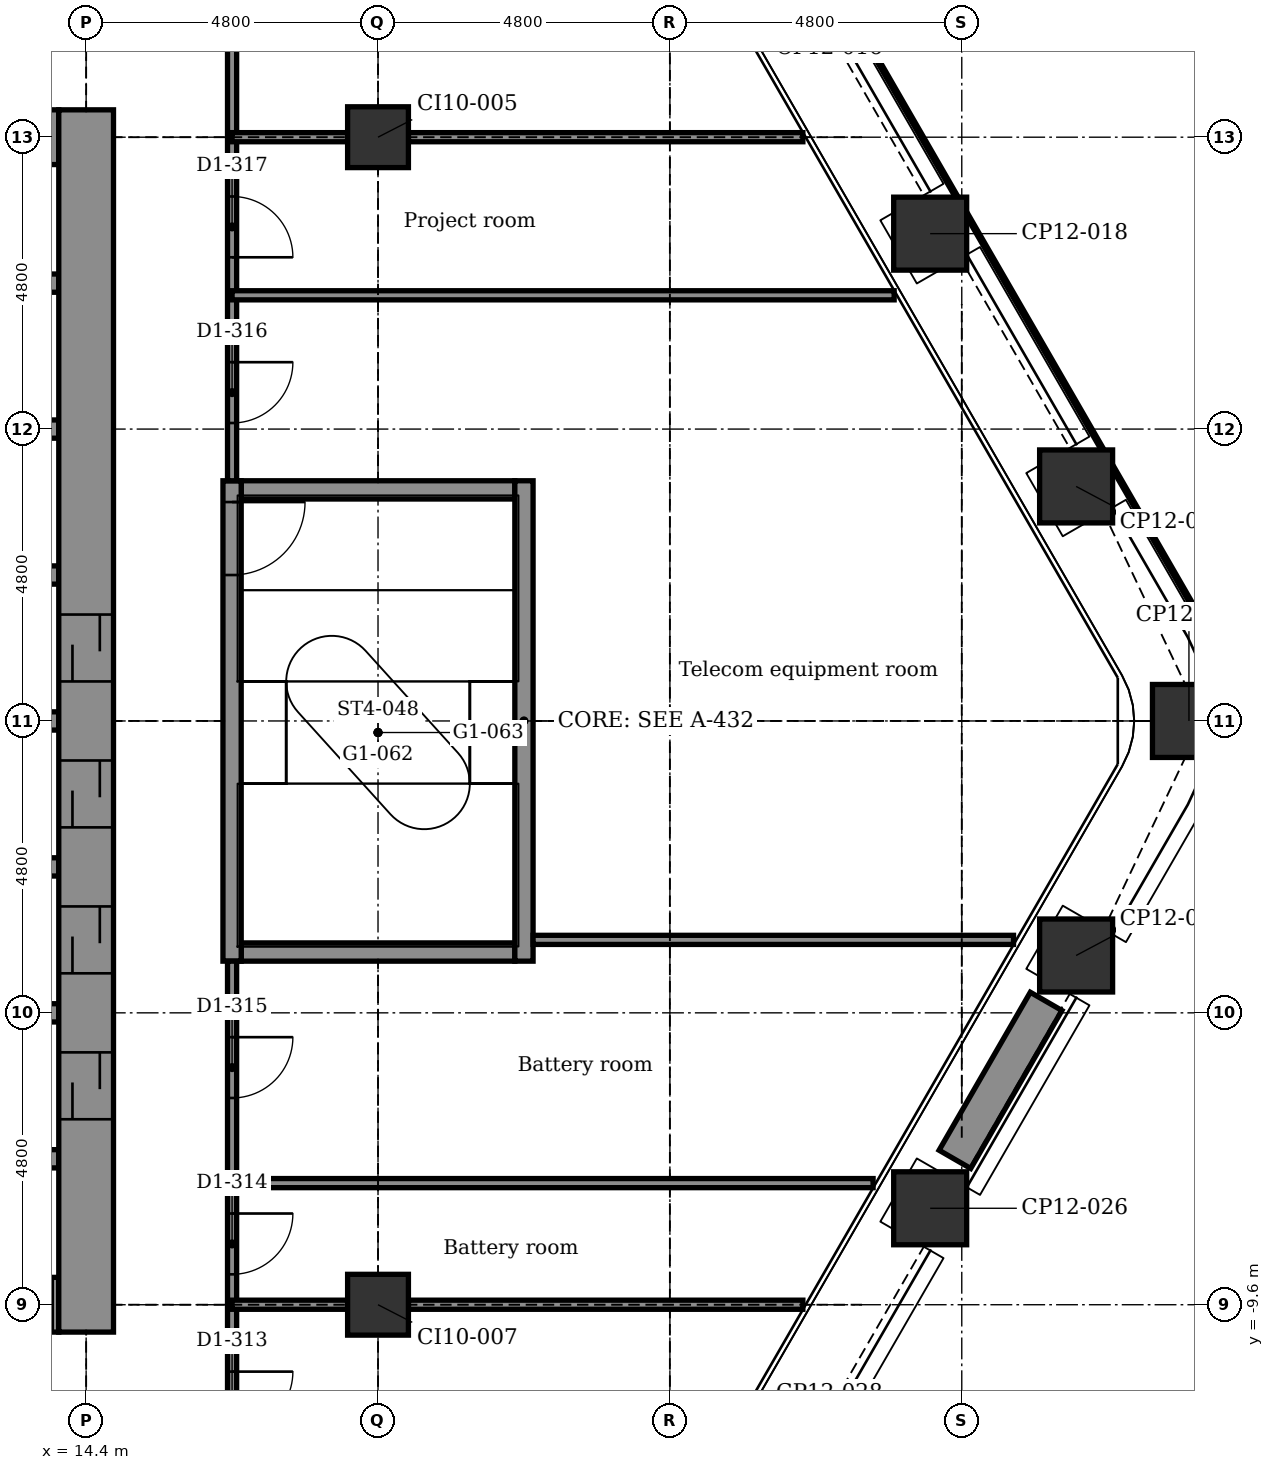
"""IFC4 building model, lengths in metres.
Left out: names, types, materials, properties, quantities, classifications, styles, units other than length and angle.
Written with IfcOpenShell. Run it as: python <this file> out.ifc"""

import sys

from ifc_helpers import new_model, si_unit, direction, frame, frame_2d, origin, origin_2d, place, context, subcontext, project, spatial, rectangle, extrude, element, fill, save


model = new_model("IFC4")
c1 = context("Model", 3, precision=1e-05, world=origin(), true_north=direction((0.0, 1.0)))
c2 = subcontext(c1, "Body", "Model", "MODEL_VIEW")
j1 = project(units=[si_unit("LENGTHUNIT", "METRE"), si_unit("PLANEANGLEUNIT", "RADIAN")], contexts=[c1])
p1 = place(None, origin())
s1 = spatial("IfcSite", under=j1, at=p1, CompositionType="ELEMENT")
p2 = place(p1, origin())
s2 = spatial("IfcBuilding", under=s1, at=p2, CompositionType="ELEMENT")
p3 = place(p2, frame((0.0, 0.0, 113.9)))
s3 = spatial("IfcBuildingStorey", under=s2, at=p3, CompositionType="ELEMENT", Elevation=113.9)
for number, where, z_axis, x_axis in (
    (1, (28.28, 8.014, -0.2), (0.0, 0.0, 1.0), (0.866, 0.5, 0.0)),
    (2, (30.68, 3.857, -0.2), (0.0, 0.0, 1.0), (0.866, 0.5, 0.0)),
    (3, (32.536, 0.0, -0.2), (0.0, 0.0, 1.0), (1.0, 0.0, 0.0)),
    (4, (30.68, -3.857, -0.2), (0.0, 0.0, 1.0), (0.5, 0.866, 0.0)),
    (5, (28.28, -8.014, -0.2), (0.0, 0.0, 1.0), (0.5, 0.866, 0.0)),
):
    element("IfcColumn", number, at=place(p3, frame(where, z_axis=z_axis, x_axis=x_axis)), inside=s3, PredefinedType="COLUMN", context=c2, shape_type="SweptSolid", body=[
        extrude(rectangle(XDim=1.2, YDim=1.2, at=origin_2d()), origin(), (0.0, 0.0, 1.0), 4.5),
    ])
for number, where, z_axis, x_axis in (
    (6, (19.2, -9.6, -0.2), (0.0, 0.0, 1.0), (1.0, 0.0, 0.0)),
    (7, (19.2, 9.6, -0.2), (0.0, 0.0, 1.0), (1.0, 0.0, 0.0)),
):
    element("IfcColumn", number, at=place(p3, frame(where, z_axis=z_axis, x_axis=x_axis)), inside=s3, PredefinedType="COLUMN", context=c2, shape_type="SweptSolid", body=[
        extrude(rectangle(XDim=1.0, YDim=1.0, at=origin_2d()), origin(), (0.0, 0.0, 1.0), 4.5),
    ])
p4 = place(p3, frame((10.05, -9.6, -0.2), z_axis=(0.0, 0.0, 1.0), x_axis=(1.0, 0.0, 0.0)))
e8 = element("IfcWall", 8, at=p4, inside=s3, PredefinedType="SHEAR", context=c2, shape_type="SweptSolid", body=[
    extrude(rectangle(XDim=3.9, YDim=0.9, at=frame_2d((1.95, 0.0))), origin(), (0.0, 0.0, 1.0), 4.5),
])
p5 = place(p4, frame((0.5, 0.0, 0.2)))
e9 = element("IfcOpeningElement", 9, at=p5, cuts=e8, PredefinedType="OPENING", context=c2, shape_type="SweptSolid", body=[
    extrude(rectangle(XDim=0.9, YDim=2.1, at=frame_2d((0.45, 1.05))), frame((0.0, 0.46, 0.0), z_axis=(0.0, -1.0, 0.0), x_axis=(1.0, 0.0, 0.0)), (0.0, 0.0, 1.0), 0.92),
])
p6 = place(p4, frame((2.9, 0.0, 0.2)))
e10 = element("IfcOpeningElement", 10, at=p6, cuts=e8, PredefinedType="OPENING", context=c2, shape_type="SweptSolid", body=[
    extrude(rectangle(XDim=0.9, YDim=2.1, at=frame_2d((0.45, 1.05))), frame((0.0, 0.46, 0.0), z_axis=(0.0, -1.0, 0.0), x_axis=(1.0, 0.0, 0.0)), (0.0, 0.0, 1.0), 0.92),
])
for number, where, z_axis, x_axis in (
    (11, (10.05, -7.2, -0.2), (0.0, 0.0, 1.0), (1.0, 0.0, 0.0)),
    (12, (10.05, -4.8, -0.2), (0.0, 0.0, 1.0), (1.0, 0.0, 0.0)),
):
    element("IfcWall", number, at=place(p3, frame(where, z_axis=z_axis, x_axis=x_axis)), inside=s3, PredefinedType="STANDARD", context=c2, shape_type="SweptSolid", body=[
        extrude(rectangle(XDim=3.9, YDim=0.3, at=frame_2d((1.95, 0.0))), origin(), (0.0, 0.0, 1.0), 4.5),
    ])
p7 = place(p3, frame((16.95, -3.8, -0.2), z_axis=(0.0, 0.0, 1.0), x_axis=(1.0, 0.0, 0.0)))
e13 = element("IfcWall", 13, at=p7, inside=s3, PredefinedType="STANDARD", context=c2, shape_type="SweptSolid", body=[
    extrude(rectangle(XDim=4.5, YDim=0.3, at=frame_2d((2.25, 0.0))), origin(), (0.0, 0.0, 1.0), 4.5),
])
for number, where, z_axis, x_axis in (
    (14, (10.05, -2.4, -0.2), (0.0, 0.0, 1.0), (1.0, 0.0, 0.0)),
    (15, (10.05, 0.0, -0.2), (0.0, 0.0, 1.0), (1.0, 0.0, 0.0)),
    (16, (10.05, 2.4, -0.2), (0.0, 0.0, 1.0), (1.0, 0.0, 0.0)),
):
    element("IfcWall", number, at=place(p3, frame(where, z_axis=z_axis, x_axis=x_axis)), inside=s3, PredefinedType="STANDARD", context=c2, shape_type="SweptSolid", body=[
        extrude(rectangle(XDim=3.9, YDim=0.3, at=frame_2d((1.95, 0.0))), origin(), (0.0, 0.0, 1.0), 4.5),
    ])
p8 = place(p3, frame((16.95, 3.8, -0.2), z_axis=(0.0, 0.0, 1.0), x_axis=(1.0, 0.0, 0.0)))
e17 = element("IfcWall", 17, at=p8, inside=s3, PredefinedType="STANDARD", context=c2, shape_type="SweptSolid", body=[
    extrude(rectangle(XDim=4.5, YDim=0.3, at=frame_2d((2.25, 0.0))), origin(), (0.0, 0.0, 1.0), 4.5),
])
for number, where, z_axis, x_axis in (
    (18, (10.05, 4.8, -0.2), (0.0, 0.0, 1.0), (1.0, 0.0, 0.0)),
    (19, (10.05, 7.2, -0.2), (0.0, 0.0, 1.0), (1.0, 0.0, 0.0)),
):
    element("IfcWall", number, at=place(p3, frame(where, z_axis=z_axis, x_axis=x_axis)), inside=s3, PredefinedType="STANDARD", context=c2, shape_type="SweptSolid", body=[
        extrude(rectangle(XDim=3.9, YDim=0.3, at=frame_2d((1.95, 0.0))), origin(), (0.0, 0.0, 1.0), 4.5),
    ])
p9 = place(p3, frame((10.05, 9.6, -0.2), z_axis=(0.0, 0.0, 1.0), x_axis=(1.0, 0.0, 0.0)))
e20 = element("IfcWall", 20, at=p9, inside=s3, PredefinedType="SHEAR", context=c2, shape_type="SweptSolid", body=[
    extrude(rectangle(XDim=3.9, YDim=0.9, at=frame_2d((1.95, 0.0))), origin(), (0.0, 0.0, 1.0), 4.5),
])
p10 = place(p9, frame((1.5, 0.0, 0.2)))
e21 = element("IfcOpeningElement", 21, at=p10, cuts=e20, PredefinedType="OPENING", context=c2, shape_type="SweptSolid", body=[
    extrude(rectangle(XDim=0.9, YDim=2.1, at=frame_2d((0.45, 1.05))), frame((0.0, 0.46, 0.0), z_axis=(0.0, -1.0, 0.0), x_axis=(1.0, 0.0, 0.0)), (0.0, 0.0, 1.0), 0.92),
])
p11 = place(p3, frame((14.4, -10.05, -0.2), z_axis=(0.0, 0.0, 1.0), x_axis=(0.0, 1.0, 0.0)))
e22 = element("IfcWall", 22, at=p11, inside=s3, PredefinedType="SHEAR", context=c2, shape_type="SweptSolid", body=[
    extrude(rectangle(XDim=20.1, YDim=0.9, at=frame_2d((10.05, 0.0))), origin(), (0.0, 0.0, 1.0), 4.5),
])
p12 = place(p11, frame((3.5, 0.0, 0.2)))
e23 = element("IfcOpeningElement", 23, at=p12, cuts=e22, PredefinedType="OPENING", context=c2, shape_type="SweptSolid", body=[
    extrude(rectangle(XDim=1.1, YDim=2.1, at=frame_2d((0.55, 1.05))), frame((0.0, 0.46, 0.0), z_axis=(0.0, -1.0, 0.0), x_axis=(1.0, 0.0, 0.0)), (0.0, 0.0, 1.0), 0.92),
])
p13 = place(p11, frame((5.9, 0.0, 0.2)))
e24 = element("IfcOpeningElement", 24, at=p13, cuts=e22, PredefinedType="OPENING", context=c2, shape_type="SweptSolid", body=[
    extrude(rectangle(XDim=1.1, YDim=2.1, at=frame_2d((0.55, 1.05))), frame((0.0, 0.46, 0.0), z_axis=(0.0, -1.0, 0.0), x_axis=(1.0, 0.0, 0.0)), (0.0, 0.0, 1.0), 0.92),
])
p14 = place(p11, frame((8.3, 0.0, 0.2)))
e25 = element("IfcOpeningElement", 25, at=p14, cuts=e22, PredefinedType="OPENING", context=c2, shape_type="SweptSolid", body=[
    extrude(rectangle(XDim=1.1, YDim=2.1, at=frame_2d((0.55, 1.05))), frame((0.0, 0.46, 0.0), z_axis=(0.0, -1.0, 0.0), x_axis=(1.0, 0.0, 0.0)), (0.0, 0.0, 1.0), 0.92),
])
p15 = place(p11, frame((10.7, 0.0, 0.2)))
e26 = element("IfcOpeningElement", 26, at=p15, cuts=e22, PredefinedType="OPENING", context=c2, shape_type="SweptSolid", body=[
    extrude(rectangle(XDim=1.1, YDim=2.1, at=frame_2d((0.55, 1.05))), frame((0.0, 0.46, 0.0), z_axis=(0.0, -1.0, 0.0), x_axis=(1.0, 0.0, 0.0)), (0.0, 0.0, 1.0), 0.92),
])
p16 = place(p3, frame((16.8, -3.95, -0.2), z_axis=(0.0, 0.0, 1.0), x_axis=(0.0, 1.0, 0.0)))
e27 = element("IfcWall", 27, at=p16, inside=s3, PredefinedType="STANDARD", context=c2, shape_type="SweptSolid", body=[
    extrude(rectangle(XDim=7.9, YDim=0.3, at=frame_2d((3.95, 0.0))), origin(), (0.0, 0.0, 1.0), 4.5),
])
p17 = place(p16, frame((6.35, 0.0, 0.2)))
e28 = element("IfcOpeningElement", 28, at=p17, cuts=e27, PredefinedType="OPENING", context=c2, shape_type="SweptSolid", body=[
    extrude(rectangle(XDim=1.2, YDim=2.1, at=frame_2d((0.6, 1.05))), frame((0.0, 0.16, 0.0), z_axis=(0.0, -1.0, 0.0), x_axis=(1.0, 0.0, 0.0)), (0.0, 0.0, 1.0), 0.32),
])
p18 = place(p3, frame((21.6, -3.95, -0.2), z_axis=(0.0, 0.0, 1.0), x_axis=(0.0, 1.0, 0.0)))
e29 = element("IfcWall", 29, at=p18, inside=s3, PredefinedType="STANDARD", context=c2, shape_type="SweptSolid", body=[
    extrude(rectangle(XDim=7.9, YDim=0.3, at=frame_2d((3.95, 0.0))), origin(), (0.0, 0.0, 1.0), 4.5),
])
p19 = place(p3, frame((30.187, -4.611, 0.0), z_axis=(0.0, 0.0, 1.0), x_axis=(-0.499990139034, -0.866031096941, 0.0)))
e30 = element("IfcWall", 30, at=p19, inside=s3, PredefinedType="USERDEFINED", context=c2, shape_type="SweptSolid", body=[
    extrude(rectangle(XDim=3.0, YDim=0.6, at=frame_2d((1.5, 0.0))), origin(), (0.0, 0.0, 1.0), 0.7),
])
p20 = place(p3, frame((16.8, -25.858, 0.0), z_axis=(0.0, 0.0, 1.0), x_axis=(0.0, 1.0, 0.0)))
e31 = element("IfcWall", 31, at=p20, inside=s3, PredefinedType="PARTITIONING", context=c2, shape_type="SweptSolid", body=[
    extrude(rectangle(XDim=21.908, YDim=0.15, at=frame_2d((10.954, 0.0))), origin(), (0.0, 0.0, 1.0), 4.3),
])
p21 = place(p20, frame((14.158, 0.0, 0.0)))
e32 = element("IfcOpeningElement", 32, at=p21, cuts=e31, PredefinedType="OPENING", context=c2, shape_type="SweptSolid", body=[
    extrude(rectangle(XDim=1.0, YDim=2.1, at=frame_2d((0.5, 1.05))), frame((0.0, 0.085, 0.0), z_axis=(0.0, -1.0, 0.0), x_axis=(1.0, 0.0, 0.0)), (0.0, 0.0, 1.0), 0.17),
])
p22 = place(p20, frame((16.759, 0.0, 0.0)))
e33 = element("IfcOpeningElement", 33, at=p22, cuts=e31, PredefinedType="OPENING", context=c2, shape_type="SweptSolid", body=[
    extrude(rectangle(XDim=1.0, YDim=2.1, at=frame_2d((0.5, 1.05))), frame((0.0, 0.085, 0.0), z_axis=(0.0, -1.0, 0.0), x_axis=(1.0, 0.0, 0.0)), (0.0, 0.0, 1.0), 0.17),
])
p23 = place(p20, frame((19.658, 0.0, 0.0)))
e34 = element("IfcOpeningElement", 34, at=p23, cuts=e31, PredefinedType="OPENING", context=c2, shape_type="SweptSolid", body=[
    extrude(rectangle(XDim=1.0, YDim=2.1, at=frame_2d((0.5, 1.05))), frame((0.0, 0.085, 0.0), z_axis=(0.0, -1.0, 0.0), x_axis=(1.0, 0.0, 0.0)), (0.0, 0.0, 1.0), 0.17),
])
p24 = place(p3, frame((16.8, 3.95, 0.0), z_axis=(0.0, 0.0, 1.0), x_axis=(0.0, 1.0, 0.0)))
e35 = element("IfcWall", 35, at=p24, inside=s3, PredefinedType="PARTITIONING", context=c2, shape_type="SweptSolid", body=[
    extrude(rectangle(XDim=21.908, YDim=0.15, at=frame_2d((10.954, 0.0))), origin(), (0.0, 0.0, 1.0), 4.3),
])
p25 = place(p24, frame((0.95, 0.0, 0.0)))
e36 = element("IfcOpeningElement", 36, at=p25, cuts=e35, PredefinedType="OPENING", context=c2, shape_type="SweptSolid", body=[
    extrude(rectangle(XDim=1.0, YDim=2.1, at=frame_2d((0.5, 1.05))), frame((0.0, 0.085, 0.0), z_axis=(0.0, -1.0, 0.0), x_axis=(1.0, 0.0, 0.0)), (0.0, 0.0, 1.0), 0.17),
])
p26 = place(p24, frame((3.675, 0.0, 0.0)))
e37 = element("IfcOpeningElement", 37, at=p26, cuts=e35, PredefinedType="OPENING", context=c2, shape_type="SweptSolid", body=[
    extrude(rectangle(XDim=1.0, YDim=2.1, at=frame_2d((0.5, 1.05))), frame((0.0, 0.085, 0.0), z_axis=(0.0, -1.0, 0.0), x_axis=(1.0, 0.0, 0.0)), (0.0, 0.0, 1.0), 0.17),
])
p27 = place(p24, frame((7.35, 0.0, 0.0)))
e38 = element("IfcOpeningElement", 38, at=p27, cuts=e35, PredefinedType="OPENING", context=c2, shape_type="SweptSolid", body=[
    extrude(rectangle(XDim=1.0, YDim=2.1, at=frame_2d((0.5, 1.05))), frame((0.0, 0.085, 0.0), z_axis=(0.0, -1.0, 0.0), x_axis=(1.0, 0.0, 0.0)), (0.0, 0.0, 1.0), 0.17),
])
p28 = place(p3, frame((16.8, -9.6, 0.0), z_axis=(0.0, 0.0, 1.0), x_axis=(1.0, 0.0, 0.0)))
e39 = element("IfcWall", 39, at=p28, inside=s3, PredefinedType="PARTITIONING", context=c2, shape_type="SweptSolid", body=[
    extrude(rectangle(XDim=1.9, YDim=0.15, at=frame_2d((0.95, 0.0))), origin(), (0.0, 0.0, 1.0), 3.692),
])
p29 = place(p3, frame((19.7, -9.6, 0.0), z_axis=(0.0, 0.0, 1.0), x_axis=(1.0, 0.0, 0.0)))
e40 = element("IfcWall", 40, at=p29, inside=s3, PredefinedType="PARTITIONING", context=c2, shape_type="SweptSolid", body=[
    extrude(rectangle(XDim=6.487, YDim=0.15, at=frame_2d((3.243, 0.0))), origin(), (0.0, 0.0, 1.0), 3.692),
])
p30 = place(p3, frame((16.8, -7.6, 0.0), z_axis=(0.0, 0.0, 1.0), x_axis=(1.0, 0.0, 0.0)))
e41 = element("IfcWall", 41, at=p30, inside=s3, PredefinedType="PARTITIONING", context=c2, shape_type="SweptSolid", body=[
    extrude(rectangle(XDim=10.542, YDim=0.15, at=frame_2d((5.271, 0.0))), origin(), (0.0, 0.0, 1.0), 4.3),
])
p31 = place(p3, frame((21.75, -3.6, 0.0), z_axis=(0.0, 0.0, 1.0), x_axis=(1.0, 0.0, 0.0)))
e42 = element("IfcWall", 42, at=p31, inside=s3, PredefinedType="PARTITIONING", context=c2, shape_type="SweptSolid", body=[
    extrude(rectangle(XDim=7.901, YDim=0.15, at=frame_2d((3.95, 0.0))), origin(), (0.0, 0.0, 1.0), 4.3),
])
p32 = place(p3, frame((16.8, 7.0, 0.0), z_axis=(0.0, 0.0, 1.0), x_axis=(1.0, 0.0, 0.0)))
e43 = element("IfcWall", 43, at=p32, inside=s3, PredefinedType="PARTITIONING", context=c2, shape_type="SweptSolid", body=[
    extrude(rectangle(XDim=10.888, YDim=0.15, at=frame_2d((5.444, 0.0))), origin(), (0.0, 0.0, 1.0), 4.3),
])
p33 = place(p3, frame((16.8, 9.6, 0.0), z_axis=(0.0, 0.0, 1.0), x_axis=(1.0, 0.0, 0.0)))
e44 = element("IfcWall", 44, at=p33, inside=s3, PredefinedType="PARTITIONING", context=c2, shape_type="SweptSolid", body=[
    extrude(rectangle(XDim=1.9, YDim=0.15, at=frame_2d((0.95, 0.0))), origin(), (0.0, 0.0, 1.0), 3.692),
])
p34 = place(p3, frame((19.7, 9.6, 0.0), z_axis=(0.0, 0.0, 1.0), x_axis=(1.0, 0.0, 0.0)))
e45 = element("IfcWall", 45, at=p34, inside=s3, PredefinedType="PARTITIONING", context=c2, shape_type="SweptSolid", body=[
    extrude(rectangle(XDim=6.487, YDim=0.15, at=frame_2d((3.243, 0.0))), origin(), (0.0, 0.0, 1.0), 3.692),
])
p35 = place(p21, frame((1.0, 0.0, 0.0), z_axis=(0.0, 0.0, 1.0), x_axis=(-1.0, 0.0, 0.0)))
e46 = element("IfcDoor", 46, at=p35, inside=s3, OperationType="SINGLE_SWING_RIGHT", PredefinedType="DOOR", context=c2, shape_type="SweptSolid", body=[
    extrude(rectangle(XDim=1.0, YDim=2.1, at=frame_2d((0.5, 1.05))), frame((0.0, 0.025, 0.0), z_axis=(0.0, -1.0, 0.0), x_axis=(1.0, 0.0, 0.0)), (0.0, 0.0, 1.0), 0.05),
])
fill(e32, e46)
p36 = place(p22, frame((1.0, 0.0, 0.0), z_axis=(0.0, 0.0, 1.0), x_axis=(-1.0, 0.0, 0.0)))
e47 = element("IfcDoor", 47, at=p36, inside=s3, OperationType="SINGLE_SWING_RIGHT", PredefinedType="DOOR", context=c2, shape_type="SweptSolid", body=[
    extrude(rectangle(XDim=1.0, YDim=2.1, at=frame_2d((0.5, 1.05))), frame((0.0, 0.025, 0.0), z_axis=(0.0, -1.0, 0.0), x_axis=(1.0, 0.0, 0.0)), (0.0, 0.0, 1.0), 0.05),
])
fill(e33, e47)
p37 = place(p23, frame((1.0, 0.0, 0.0), z_axis=(0.0, 0.0, 1.0), x_axis=(-1.0, 0.0, 0.0)))
e48 = element("IfcDoor", 48, at=p37, inside=s3, OperationType="SINGLE_SWING_RIGHT", PredefinedType="DOOR", context=c2, shape_type="SweptSolid", body=[
    extrude(rectangle(XDim=1.0, YDim=2.1, at=frame_2d((0.5, 1.05))), frame((0.0, 0.025, 0.0), z_axis=(0.0, -1.0, 0.0), x_axis=(1.0, 0.0, 0.0)), (0.0, 0.0, 1.0), 0.05),
])
fill(e34, e48)
p38 = place(p25, frame((1.0, 0.0, 0.0), z_axis=(0.0, 0.0, 1.0), x_axis=(-1.0, 0.0, 0.0)))
e49 = element("IfcDoor", 49, at=p38, inside=s3, OperationType="SINGLE_SWING_RIGHT", PredefinedType="DOOR", context=c2, shape_type="SweptSolid", body=[
    extrude(rectangle(XDim=1.0, YDim=2.1, at=frame_2d((0.5, 1.05))), frame((0.0, 0.025, 0.0), z_axis=(0.0, -1.0, 0.0), x_axis=(1.0, 0.0, 0.0)), (0.0, 0.0, 1.0), 0.05),
])
fill(e36, e49)
p39 = place(p26, frame((1.0, 0.0, 0.0), z_axis=(0.0, 0.0, 1.0), x_axis=(-1.0, 0.0, 0.0)))
e50 = element("IfcDoor", 50, at=p39, inside=s3, OperationType="SINGLE_SWING_LEFT", PredefinedType="DOOR", context=c2, shape_type="SweptSolid", body=[
    extrude(rectangle(XDim=1.0, YDim=2.1, at=frame_2d((0.5, 1.05))), frame((0.0, 0.025, 0.0), z_axis=(0.0, -1.0, 0.0), x_axis=(1.0, 0.0, 0.0)), (0.0, 0.0, 1.0), 0.05),
])
fill(e37, e50)
p40 = place(p12, origin())
e51 = element("IfcDoor", 51, at=p40, inside=s3, OperationType="DOUBLE_DOOR_SLIDING", PredefinedType="DOOR", context=c2, shape_type="SweptSolid", body=[
    extrude(rectangle(XDim=1.1, YDim=2.1, at=frame_2d((0.55, 1.05))), frame((0.0, 0.025, 0.0), z_axis=(0.0, -1.0, 0.0), x_axis=(1.0, 0.0, 0.0)), (0.0, 0.0, 1.0), 0.05),
])
fill(e23, e51)
p41 = place(p13, origin())
e52 = element("IfcDoor", 52, at=p41, inside=s3, OperationType="DOUBLE_DOOR_SLIDING", PredefinedType="DOOR", context=c2, shape_type="SweptSolid", body=[
    extrude(rectangle(XDim=1.1, YDim=2.1, at=frame_2d((0.55, 1.05))), frame((0.0, 0.025, 0.0), z_axis=(0.0, -1.0, 0.0), x_axis=(1.0, 0.0, 0.0)), (0.0, 0.0, 1.0), 0.05),
])
fill(e24, e52)
p42 = place(p14, origin())
e53 = element("IfcDoor", 53, at=p42, inside=s3, OperationType="DOUBLE_DOOR_SLIDING", PredefinedType="DOOR", context=c2, shape_type="SweptSolid", body=[
    extrude(rectangle(XDim=1.1, YDim=2.1, at=frame_2d((0.55, 1.05))), frame((0.0, 0.025, 0.0), z_axis=(0.0, -1.0, 0.0), x_axis=(1.0, 0.0, 0.0)), (0.0, 0.0, 1.0), 0.05),
])
fill(e25, e53)
p43 = place(p15, origin())
e54 = element("IfcDoor", 54, at=p43, inside=s3, OperationType="DOUBLE_DOOR_SLIDING", PredefinedType="DOOR", context=c2, shape_type="SweptSolid", body=[
    extrude(rectangle(XDim=1.1, YDim=2.1, at=frame_2d((0.55, 1.05))), frame((0.0, 0.025, 0.0), z_axis=(0.0, -1.0, 0.0), x_axis=(1.0, 0.0, 0.0)), (0.0, 0.0, 1.0), 0.05),
])
fill(e26, e54)
p44 = place(p17, frame((1.2, 0.0, 0.0), z_axis=(0.0, 0.0, 1.0), x_axis=(-1.0, 0.0, 0.0)))
e55 = element("IfcDoor", 55, at=p44, inside=s3, OperationType="SINGLE_SWING_RIGHT", PredefinedType="DOOR", context=c2, shape_type="SweptSolid", body=[
    extrude(rectangle(XDim=1.2, YDim=2.1, at=frame_2d((0.6, 1.05))), frame((0.0, 0.025, 0.0), z_axis=(0.0, -1.0, 0.0), x_axis=(1.0, 0.0, 0.0)), (0.0, 0.0, 1.0), 0.05),
])
fill(e28, e55)
save(model, sys.argv[1])
